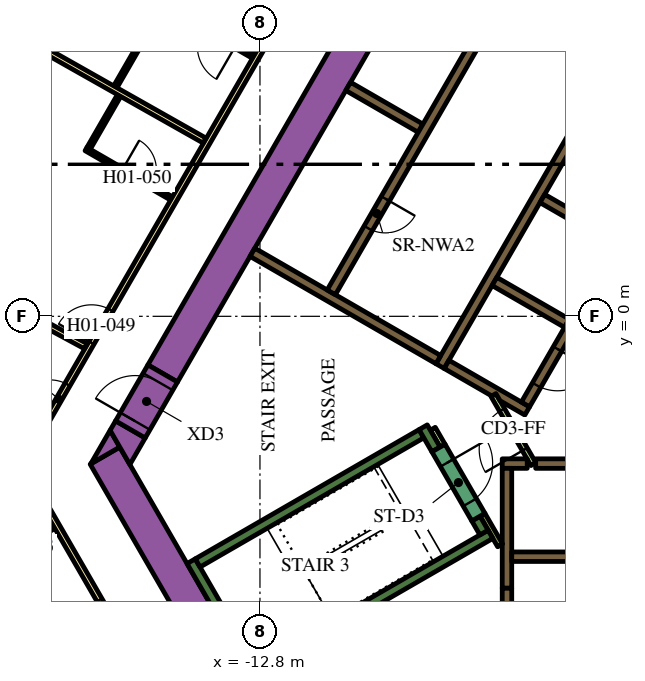
"""IFC4 building model, lengths in metres.
Left out: names, types, materials, properties, quantities, classifications, styles, units other than length and angle.
Written with IfcOpenShell. Run it as: python <this file> out.ifc"""

import sys

from ifc_helpers import new_model, si_unit, direction, frame, frame_2d, origin, place, context, subcontext, project, spatial, polyline, rectangle, outline, extrude, element, fill, save


model = new_model("IFC4")
c1 = context("Model", 3, precision=1e-05, world=origin(), true_north=direction((0.0, 1.0)))
c2 = subcontext(c1, "Body", "Model", "MODEL_VIEW")
j1 = project(units=[si_unit("LENGTHUNIT", "METRE"), si_unit("PLANEANGLEUNIT", "RADIAN")], contexts=[c1])
p1 = place(None, origin())
s1 = spatial("IfcSite", under=j1, at=p1, CompositionType="ELEMENT")
p2 = place(p1, origin())
s2 = spatial("IfcBuilding", under=s1, at=p2, CompositionType="ELEMENT")
p3 = place(p2, frame((0.0, 0.0, 27.6)))
s3 = spatial("IfcBuildingStorey", under=s2, at=p3, CompositionType="ELEMENT", Elevation=27.6)
p4 = place(p3, frame((-15.36, -1.503, 0.0), z_axis=(0.0, 0.0, 1.0), x_axis=(0.50000389221, 0.866023156604, 0.0)))
e1 = element("IfcWall", 1, at=p4, inside=s3, PredefinedType="SOLIDWALL", context=c2, shape_type="SweptSolid", body=[
    extrude(rectangle(XDim=21.0, YDim=0.9, at=frame_2d((10.5, 0.0))), origin(), (0.0, 0.0, 1.0), 3.9),
])
p5 = place(p3, frame((-12.134, -11.883, 0.0), z_axis=(0.0, 0.0, 1.0), x_axis=(-0.500005339912, 0.866022320763, 0.0)))
e2 = element("IfcWall", 2, at=p5, inside=s3, PredefinedType="SOLIDWALL", context=c2, shape_type="SweptSolid", body=[
    extrude(rectangle(XDim=9.488, YDim=0.9, at=frame_2d((4.744, 0.0))), origin(), (0.0, 0.0, 1.0), 3.9),
])
p6 = place(p3, origin())
e3 = element("IfcWall", 3, at=p6, inside=s3, PredefinedType="SOLIDWALL", context=c2, shape_type="SweptSolid", body=[
    extrude(outline(polyline([(-16.489, -3.44), (-17.251, -3.88), (-16.743, -3.0), (-16.489, -3.44)])), origin(), (0.0, 0.0, 1.0), 3.9),
])
e4 = element("IfcWall", 4, at=p6, inside=s3, PredefinedType="SOLIDWALL", context=c2, shape_type="SweptSolid", body=[
    extrude(outline(polyline([(-15.82, -3.201), (-16.223, -3.9), (-16.743, -3.0), (-16.599, -2.751), (-15.82, -3.201)])), origin(), (0.0, 0.0, 1.0), 3.9),
])
p7 = place(p3, frame((-12.885, -9.431, 0.0), z_axis=(0.0, 0.0, 1.0), x_axis=(-0.500020560727, 0.866013532718, 0.0)))
e5 = element("IfcWall", 5, at=p7, inside=s3, PredefinedType="SOLIDWALL", context=c2, shape_type="SweptSolid", body=[
    extrude(rectangle(XDim=3.45, YDim=0.25, at=frame_2d((1.725, 0.0))), origin(), (0.0, 0.0, 1.0), 3.9),
])
p8 = place(p3, frame((-14.44, -6.49, 0.0), z_axis=(0.0, 0.0, 1.0), x_axis=(0.866022966069, 0.500004222222, 0.0)))
e6 = element("IfcWall", 6, at=p8, inside=s3, PredefinedType="SOLIDWALL", context=c2, shape_type="SweptSolid", body=[
    extrude(rectangle(XDim=6.8, YDim=0.25, at=frame_2d((3.4, 0.0))), origin(), (0.0, 0.0, 1.0), 3.9),
])
p9 = place(p3, frame((-8.168, -3.503, 0.0), z_axis=(0.0, 0.0, 1.0), x_axis=(-0.499952099219, 0.866053057547, 0.0)))
e7 = element("IfcWall", 7, at=p9, inside=s3, PredefinedType="SOLIDWALL", context=c2, shape_type="SweptSolid", body=[
    extrude(rectangle(XDim=0.675, YDim=0.25, at=frame_2d((0.337, 0.0))), origin(), (0.0, 0.0, 1.0), 3.9),
])
p10 = place(p3, frame((-12.84, -9.261, 0.0), z_axis=(0.0, 0.0, 1.0), x_axis=(0.866016039709, 0.500016218704, 0.0)))
e8 = element("IfcWall", 8, at=p10, inside=s3, PredefinedType="SOLIDWALL", context=c2, shape_type="SweptSolid", body=[
    extrude(rectangle(XDim=7.05, YDim=0.25, at=frame_2d((3.525, 0.0))), origin(), (0.0, 0.0, 1.0), 3.9),
])
p11 = place(p3, frame((-6.905, -5.69, 0.0), z_axis=(0.0, 0.0, 1.0), x_axis=(-0.500402024738, 0.865793170242, 0.0)))
e9 = element("IfcWall", 9, at=p11, inside=s3, PredefinedType="SOLIDWALL", context=c2, shape_type="SweptSolid", body=[
    extrude(rectangle(XDim=0.425, YDim=0.25, at=frame_2d((0.212, 0.0))), origin(), (0.0, 0.0, 1.0), 3.9),
])
p12 = place(p3, frame((-5.545, -3.875, 0.0), z_axis=(0.0, 0.0, 1.0), x_axis=(1.0, 0.0, 0.0)))
e10 = element("IfcWall", 10, at=p12, inside=s3, PredefinedType="SOLIDWALL", context=c2, shape_type="SweptSolid", body=[
    extrude(rectangle(XDim=11.97, YDim=0.25, at=frame_2d((5.985, 0.0))), origin(), (0.0, 0.0, 1.0), 3.9),
])
p13 = place(p3, frame((-6.425, -3.875, 0.0), z_axis=(0.0, 0.0, 1.0), x_axis=(1.0, 0.0, 0.0)))
e11 = element("IfcWall", 11, at=p13, inside=s3, PredefinedType="SOLIDWALL", context=c2, shape_type="SweptSolid", body=[
    extrude(rectangle(XDim=0.658, YDim=0.25, at=frame_2d((0.329, 0.0))), origin(), (0.0, 0.0, 1.0), 3.9),
])
p14 = place(p3, frame((-6.3, -4.0, 0.0), z_axis=(0.0, 0.0, 1.0), x_axis=(0.0, -1.0, 0.0)))
e12 = element("IfcWall", 12, at=p14, inside=s3, PredefinedType="SOLIDWALL", context=c2, shape_type="SweptSolid", body=[
    extrude(rectangle(XDim=3.154, YDim=0.25, at=frame_2d((1.577, 0.0))), origin(), (0.0, 0.0, 1.0), 3.9),
])
p15 = place(p3, frame((-8.06, -1.311, 0.0), z_axis=(0.0, 0.0, 1.0), x_axis=(0.50000273126, 0.866023826885, 0.0)))
e13 = element("IfcWall", 13, at=p15, inside=s3, PredefinedType="SOLIDWALL", context=c2, shape_type="SweptSolid", body=[
    extrude(rectangle(XDim=10.33, YDim=0.25, at=frame_2d((5.165, 0.0))), origin(), (0.0, 0.0, 1.0), 3.9),
])
for number, where, z_axis, x_axis in (
    (14, (-5.369, 3.1, 0.0), (0.0, 0.0, 1.0), (0.866, -0.5, 0.0)),
    (15, (-4.724, -0.182, 0.0), (0.0, 0.0, 1.0), (-0.866, 0.5, 0.0)),
):
    element("IfcWall", number, at=place(p3, frame(where, z_axis=z_axis, x_axis=x_axis)), inside=s3, PredefinedType="SOLIDWALL", context=c2, shape_type="SweptSolid", body=[
        extrude(rectangle(XDim=2.2, YDim=0.25, at=frame_2d((1.1, 0.0))), origin(), (0.0, 0.0, 1.0), 3.9),
    ])
e16 = element("IfcWall", 16, at=p6, inside=s3, PredefinedType="SOLIDWALL", context=c2, shape_type="SweptSolid", body=[
    extrude(outline(polyline([(-5.922, -2.257), (-5.922, -2.257), (-5.705, -2.382), (-5.83, -2.598), (-6.483, -2.221), (-6.591, -2.033), (-6.591, -2.033), (-6.7, -2.096), (-7.952, -1.373), (-7.827, -1.156), (-5.922, -2.257)])), origin(), (0.0, 0.0, 1.0), 3.9),
])
p16 = place(p3, frame((-8.106, -1.14, 0.0), z_axis=(0.0, 0.0, 1.0), x_axis=(-0.866000643155, 0.500042884217, 0.0)))
e17 = element("IfcWall", 17, at=p16, inside=s3, PredefinedType="SOLIDWALL", context=c2, shape_type="SweptSolid", body=[
    extrude(rectangle(XDim=5.65, YDim=0.25, at=frame_2d((2.825, 0.0))), origin(), (0.0, 0.0, 1.0), 3.9),
])
p17 = place(p3, frame((-8.574, 4.95, 0.0), z_axis=(0.0, 0.0, 1.0), x_axis=(-0.866008176907, 0.50002983664, 0.0)))
e18 = element("IfcWall", 18, at=p17, inside=s3, PredefinedType="SOLIDWALL", context=c2, shape_type="SweptSolid", body=[
    extrude(rectangle(XDim=2.2, YDim=0.25, at=frame_2d((1.1, 0.0))), origin(), (0.0, 0.0, 1.0), 3.9),
])
p18 = place(p3, frame((-6.48, -6.027, 0.0), z_axis=(0.0, 0.0, 1.0), x_axis=(-0.499927229454, 0.866067413802, 0.0)))
e19 = element("IfcWall", 19, at=p18, inside=s3, PredefinedType="PARTITIONING", context=c2, shape_type="SweptSolid", body=[
    extrude(rectangle(XDim=0.929, YDim=0.15, at=frame_2d((0.464, 0.0))), origin(), (0.0, 0.0, 1.0), 3.9),
])
p19 = place(p3, frame((-8.252, -2.958, 0.0), z_axis=(0.0, 0.0, 1.0), x_axis=(0.500174715838, -0.865924508047, 0.0)))
e20 = element("IfcWall", 20, at=p19, inside=s3, PredefinedType="PARTITIONING", context=c2, shape_type="SweptSolid", body=[
    extrude(rectangle(XDim=0.514, YDim=0.15, at=frame_2d((0.257, 0.0))), origin(), (0.0, 0.0, 1.0), 2.75),
])
p20 = place(p3, frame((-6.175, -6.325, 0.0), z_axis=(0.0, 0.0, 1.0), x_axis=(1.0, 0.0, 0.0)))
e21 = element("IfcWall", 21, at=p20, inside=s3, PredefinedType="SOLIDWALL", context=c2, shape_type="SweptSolid", body=[
    extrude(rectangle(XDim=12.35, YDim=0.25, at=frame_2d((6.175, 0.0))), origin(), (0.0, 0.0, 1.0), 3.9),
])
p21 = place(p20, frame((3.205, 0.0, 0.0)))
e22 = element("IfcOpeningElement", 22, at=p21, cuts=e21, PredefinedType="OPENING", context=c2, shape_type="SweptSolid", body=[
    extrude(rectangle(XDim=0.9, YDim=2.1, at=frame_2d((0.45, 1.05))), frame((0.0, 0.135, 0.0), z_axis=(0.0, -1.0, 0.0), x_axis=(1.0, 0.0, 0.0)), (0.0, 0.0, 1.0), 0.27),
])
p22 = place(p20, frame((8.145, 0.0, 0.0)))
e23 = element("IfcOpeningElement", 23, at=p22, cuts=e21, PredefinedType="OPENING", context=c2, shape_type="SweptSolid", body=[
    extrude(rectangle(XDim=1.1, YDim=2.1, at=frame_2d((0.55, 1.05))), frame((0.0, 0.135, 0.0), z_axis=(0.0, -1.0, 0.0), x_axis=(1.0, 0.0, 0.0)), (0.0, 0.0, 1.0), 0.27),
])
p23 = place(p20, frame((10.665, 0.0, 0.0)))
e24 = element("IfcOpeningElement", 24, at=p23, cuts=e21, PredefinedType="OPENING", context=c2, shape_type="SweptSolid", body=[
    extrude(rectangle(XDim=1.1, YDim=2.1, at=frame_2d((0.55, 1.05))), frame((0.0, 0.135, 0.0), z_axis=(0.0, -1.0, 0.0), x_axis=(1.0, 0.0, 0.0)), (0.0, 0.0, 1.0), 0.27),
])
p24 = place(p3, frame((-6.008, 9.144, 0.0), z_axis=(0.0, 0.0, 1.0), x_axis=(-0.500006956611, -0.866021387346, 0.0)))
e25 = element("IfcWall", 25, at=p24, inside=s3, PredefinedType="SOLIDWALL", context=c2, shape_type="SweptSolid", body=[
    extrude(rectangle(XDim=9.83, YDim=0.25, at=frame_2d((4.915, 0.0))), origin(), (0.0, 0.0, 1.0), 3.9),
])
p25 = place(p24, frame((6.985, 0.0, 0.0)))
e26 = element("IfcOpeningElement", 26, at=p25, cuts=e25, PredefinedType="OPENING", context=c2, shape_type="SweptSolid", body=[
    extrude(rectangle(XDim=0.9, YDim=2.1, at=frame_2d((0.45, 1.05))), frame((0.0, 0.135, 0.0), z_axis=(0.0, -1.0, 0.0), x_axis=(1.0, 0.0, 0.0)), (0.0, 0.0, 1.0), 0.27),
])
p26 = place(p3, frame((-0.898, 6.194, 0.0), z_axis=(0.0, 0.0, 1.0), x_axis=(-0.499996202215, -0.866027596426, 0.0)))
e27 = element("IfcWall", 27, at=p26, inside=s3, PredefinedType="SOLIDWALL", context=c2, shape_type="SweptSolid", body=[
    extrude(rectangle(XDim=9.83, YDim=0.25, at=frame_2d((4.915, 0.0))), origin(), (0.0, 0.0, 1.0), 3.9),
])
p27 = place(p26, frame((0.585, 0.0, 0.0)))
e28 = element("IfcOpeningElement", 28, at=p27, cuts=e27, PredefinedType="OPENING", context=c2, shape_type="SweptSolid", body=[
    extrude(rectangle(XDim=1.1, YDim=2.1, at=frame_2d((0.55, 1.05))), frame((0.0, 0.135, 0.0), z_axis=(0.0, -1.0, 0.0), x_axis=(1.0, 0.0, 0.0)), (0.0, 0.0, 1.0), 0.27),
])
p28 = place(p26, frame((3.105, 0.0, 0.0)))
e29 = element("IfcOpeningElement", 29, at=p28, cuts=e27, PredefinedType="OPENING", context=c2, shape_type="SweptSolid", body=[
    extrude(rectangle(XDim=1.1, YDim=2.1, at=frame_2d((0.55, 1.05))), frame((0.0, 0.135, 0.0), z_axis=(0.0, -1.0, 0.0), x_axis=(1.0, 0.0, 0.0)), (0.0, 0.0, 1.0), 0.27),
])
p29 = place(p26, frame((5.625, 0.0, 0.0)))
e30 = element("IfcOpeningElement", 30, at=p29, cuts=e27, PredefinedType="OPENING", context=c2, shape_type="SweptSolid", body=[
    extrude(rectangle(XDim=1.1, YDim=2.1, at=frame_2d((0.55, 1.05))), frame((0.0, 0.135, 0.0), z_axis=(0.0, -1.0, 0.0), x_axis=(1.0, 0.0, 0.0)), (0.0, 0.0, 1.0), 0.27),
])
p30 = place(p26, frame((8.145, 0.0, 0.0)))
e31 = element("IfcOpeningElement", 31, at=p30, cuts=e27, PredefinedType="OPENING", context=c2, shape_type="SweptSolid", body=[
    extrude(rectangle(XDim=1.1, YDim=2.1, at=frame_2d((0.55, 1.05))), frame((0.0, 0.135, 0.0), z_axis=(0.0, -1.0, 0.0), x_axis=(1.0, 0.0, 0.0)), (0.0, 0.0, 1.0), 0.27),
])
p31 = place(p3, frame((-8.103, -3.466, 0.0), z_axis=(0.0, 0.0, 1.0), x_axis=(0.500078061341, -0.865980330357, 0.0)))
e32 = element("IfcWall", 32, at=p31, inside=s3, PredefinedType="SOLIDWALL", context=c2, shape_type="SweptSolid", body=[
    extrude(rectangle(XDim=2.1, YDim=0.4, at=frame_2d((1.05, 0.0))), origin(), (0.0, 0.0, 1.0), 3.9),
])
p32 = place(p31, frame((0.45, 0.0, 0.0)))
e33 = element("IfcOpeningElement", 33, at=p32, cuts=e32, PredefinedType="OPENING", context=c2, shape_type="SweptSolid", body=[
    extrude(rectangle(XDim=1.2, YDim=2.1, at=frame_2d((0.6, 1.05))), frame((0.0, 0.21, 0.0), z_axis=(0.0, -1.0, 0.0), x_axis=(1.0, 0.0, 0.0)), (0.0, 0.0, 1.0), 0.42),
])
p33 = place(p3, frame((-6.3, -7.154, 0.0), z_axis=(0.0, 0.0, 1.0), x_axis=(0.0, -1.0, 0.0)))
e34 = element("IfcWall", 34, at=p33, inside=s3, PredefinedType="SOLIDWALL", context=c2, shape_type="SweptSolid", body=[
    extrude(rectangle(XDim=1.8, YDim=0.25, at=frame_2d((0.9, 0.0))), origin(), (0.0, 0.0, 1.0), 3.9),
])
p34 = place(p33, frame((0.45, 0.0, 0.0)))
e35 = element("IfcOpeningElement", 35, at=p34, cuts=e34, PredefinedType="OPENING", context=c2, shape_type="SweptSolid", body=[
    extrude(rectangle(XDim=0.9, YDim=2.1, at=frame_2d((0.45, 1.05))), frame((0.0, 0.135, 0.0), z_axis=(0.0, -1.0, 0.0), x_axis=(1.0, 0.0, 0.0)), (0.0, 0.0, 1.0), 0.27),
])
p35 = place(p3, frame((-5.606, -3.89, 0.0), z_axis=(0.0, 0.0, 1.0), x_axis=(-0.500027713859, 0.866009402589, 0.0)))
e36 = element("IfcWall", 36, at=p35, inside=s3, PredefinedType="PARTITIONING", context=c2, shape_type="SweptSolid", body=[
    extrude(rectangle(XDim=2.1, YDim=0.15, at=frame_2d((1.05, 0.0))), origin(), (0.0, 0.0, 1.0), 2.75),
])
p36 = place(p35, frame((0.45, 0.0, 0.0)))
e37 = element("IfcOpeningElement", 37, at=p36, cuts=e36, PredefinedType="OPENING", context=c2, shape_type="SweptSolid", body=[
    extrude(rectangle(XDim=1.2, YDim=2.1, at=frame_2d((0.6, 1.05))), frame((0.0, 0.085, 0.0), z_axis=(0.0, -1.0, 0.0), x_axis=(1.0, 0.0, 0.0)), (0.0, 0.0, 1.0), 0.17),
])
p37 = place(p3, frame((-16.209, -2.976, 0.0), z_axis=(0.0, 0.0, 1.0), x_axis=(0.499954529098, 0.86605165483, 0.0)))
e38 = element("IfcWall", 38, at=p37, inside=s3, PredefinedType="SOLIDWALL", context=c2, shape_type="SweptSolid", body=[
    extrude(rectangle(XDim=1.7, YDim=0.9, at=frame_2d((0.85, 0.0))), origin(), (0.0, 0.0, 1.0), 3.9),
])
p38 = place(p37, frame((0.25, 0.0, 0.0)))
e39 = element("IfcOpeningElement", 39, at=p38, cuts=e38, PredefinedType="OPENING", context=c2, shape_type="SweptSolid", body=[
    extrude(rectangle(XDim=1.2, YDim=2.1, at=frame_2d((0.6, 1.05))), frame((0.0, 0.46, 0.0), z_axis=(0.0, -1.0, 0.0), x_axis=(1.0, 0.0, 0.0)), (0.0, 0.0, 1.0), 0.92),
])
p39 = place(p3, frame((-19.081, -3.9, 0.0), z_axis=(0.0, 0.0, 1.0), x_axis=(0.499998313975, 0.866026377209, 0.0)))
e40 = element("IfcWall", 40, at=p39, inside=s3, PredefinedType="PARTITIONING", context=c2, shape_type="SweptSolid", body=[
    extrude(rectangle(XDim=25.766, YDim=0.15, at=frame_2d((12.883, 0.0))), origin(), (0.0, 0.0, 1.0), 2.75),
])
p40 = place(p39, frame((24.586, 0.0, 0.0)))
e41 = element("IfcOpeningElement", 41, at=p40, cuts=e40, PredefinedType="OPENING", context=c2, shape_type="SweptSolid", body=[
    extrude(rectangle(XDim=1.0, YDim=2.1, at=frame_2d((0.5, 1.05))), frame((0.0, 0.085, 0.0), z_axis=(0.0, -1.0, 0.0), x_axis=(1.0, 0.0, 0.0)), (0.0, 0.0, 1.0), 0.17),
])
p41 = place(p39, frame((16.196, 0.0, 0.0)))
e42 = element("IfcOpeningElement", 42, at=p41, cuts=e40, PredefinedType="OPENING", context=c2, shape_type="SweptSolid", body=[
    extrude(rectangle(XDim=1.0, YDim=2.1, at=frame_2d((0.5, 1.05))), frame((0.0, 0.085, 0.0), z_axis=(0.0, -1.0, 0.0), x_axis=(1.0, 0.0, 0.0)), (0.0, 0.0, 1.0), 0.17),
])
p42 = place(p39, frame((14.789, 0.0, 0.0)))
e43 = element("IfcOpeningElement", 43, at=p42, cuts=e40, PredefinedType="OPENING", context=c2, shape_type="SweptSolid", body=[
    extrude(rectangle(XDim=1.1, YDim=2.1, at=frame_2d((0.55, 1.05))), frame((0.0, 0.085, 0.0), z_axis=(0.0, -1.0, 0.0), x_axis=(1.0, 0.0, 0.0)), (0.0, 0.0, 1.0), 0.17),
])
p43 = place(p39, frame((3.698, 0.0, 0.0)))
e44 = element("IfcOpeningElement", 44, at=p43, cuts=e40, PredefinedType="OPENING", context=c2, shape_type="SweptSolid", body=[
    extrude(rectangle(XDim=1.0, YDim=2.1, at=frame_2d((0.5, 1.05))), frame((0.0, 0.085, 0.0), z_axis=(0.0, -1.0, 0.0), x_axis=(1.0, 0.0, 0.0)), (0.0, 0.0, 1.0), 0.17),
])
p44 = place(p39, frame((1.531, 0.0, 0.0)))
e45 = element("IfcOpeningElement", 45, at=p44, cuts=e40, PredefinedType="OPENING", context=c2, shape_type="SweptSolid", body=[
    extrude(rectangle(XDim=0.9, YDim=2.1, at=frame_2d((0.45, 1.05))), frame((0.0, 0.085, 0.0), z_axis=(0.0, -1.0, 0.0), x_axis=(1.0, 0.0, 0.0)), (0.0, 0.0, 1.0), 0.17),
])
p45 = place(p3, frame((-16.412, -8.523, 0.0), z_axis=(0.0, 0.0, 1.0), x_axis=(-0.500001929737, 0.866024289647, 0.0)))
e46 = element("IfcWall", 46, at=p45, inside=s3, PredefinedType="PARTITIONING", context=c2, shape_type="SweptSolid", body=[
    extrude(rectangle(XDim=5.268, YDim=0.15, at=frame_2d((2.634, 0.0))), origin(), (0.0, 0.0, 1.0), 2.75),
])
p46 = place(p45, frame((0.226, 0.0, 0.0)))
e47 = element("IfcOpeningElement", 47, at=p46, cuts=e46, PredefinedType="OPENING", context=c2, shape_type="SweptSolid", body=[
    extrude(rectangle(XDim=1.0, YDim=2.1, at=frame_2d((0.5, 1.05))), frame((0.0, 0.085, 0.0), z_axis=(0.0, -1.0, 0.0), x_axis=(1.0, 0.0, 0.0)), (0.0, 0.0, 1.0), 0.17),
])
p47 = place(p3, frame((-24.145, 2.871, 0.0), z_axis=(0.0, 0.0, 1.0), x_axis=(0.879551725039, -0.475803281809, 0.0)))
e48 = element("IfcWall", 48, at=p47, inside=s3, PredefinedType="PARTITIONING", context=c2, shape_type="SweptSolid", body=[
    extrude(rectangle(XDim=7.688, YDim=0.15, at=frame_2d((3.844, 0.0))), origin(), (0.0, 0.0, 1.0), 2.75),
])
p48 = place(p3, frame((-21.052, 8.464, 0.0), z_axis=(0.0, 0.0, 1.0), x_axis=(0.87059371954, -0.492002617368, 0.0)))
e49 = element("IfcWall", 49, at=p48, inside=s3, PredefinedType="PARTITIONING", context=c2, shape_type="SweptSolid", body=[
    extrude(rectangle(XDim=7.803, YDim=0.15, at=frame_2d((3.902, 0.0))), origin(), (0.0, 0.0, 1.0), 2.75),
])
p49 = place(p3, frame((-12.972, 6.831, 0.0), z_axis=(0.0, 0.0, 1.0), x_axis=(-0.866018616679, 0.500011755427, 0.0)))
e50 = element("IfcWall", 50, at=p49, inside=s3, PredefinedType="PARTITIONING", context=c2, shape_type="SweptSolid", body=[
    extrude(rectangle(XDim=2.8, YDim=0.1, at=frame_2d((1.4, 0.0))), origin(), (0.0, 0.0, 1.0), 2.75),
])
p50 = place(p49, frame((0.55, 0.0, 0.0)))
e51 = element("IfcOpeningElement", 51, at=p50, cuts=e50, PredefinedType="OPENING", context=c2, shape_type="SweptSolid", body=[
    extrude(rectangle(XDim=1.0, YDim=2.1, at=frame_2d((0.5, 1.05))), frame((0.0, 0.06, 0.0), z_axis=(0.0, -1.0, 0.0), x_axis=(1.0, 0.0, 0.0)), (0.0, 0.0, 1.0), 0.12),
])
p51 = place(p3, frame((-15.379, 8.163, 0.0), z_axis=(0.0, 0.0, 1.0), x_axis=(-0.499987006516, -0.866032905446, 0.0)))
e52 = element("IfcWall", 52, at=p51, inside=s3, PredefinedType="PARTITIONING", context=c2, shape_type="SweptSolid", body=[
    extrude(rectangle(XDim=2.45, YDim=0.1, at=frame_2d((1.225, 0.0))), origin(), (0.0, 0.0, 1.0), 2.75),
])
p52 = place(p3, frame((-17.378, 4.401, 0.0), z_axis=(0.0, 0.0, 1.0), x_axis=(0.865997922154, -0.500047596559, 0.0)))
e53 = element("IfcWall", 53, at=p52, inside=s3, PredefinedType="PARTITIONING", context=c2, shape_type="SweptSolid", body=[
    extrude(rectangle(XDim=2.6, YDim=0.1, at=frame_2d((1.3, 0.0))), origin(), (0.0, 0.0, 1.0), 2.75),
])
p53 = place(p52, frame((1.1, 0.0, 0.0)))
e54 = element("IfcOpeningElement", 54, at=p53, cuts=e53, PredefinedType="OPENING", context=c2, shape_type="SweptSolid", body=[
    extrude(rectangle(XDim=0.9, YDim=2.1, at=frame_2d((0.45, 1.05))), frame((0.0, 0.06, 0.0), z_axis=(0.0, -1.0, 0.0), x_axis=(1.0, 0.0, 0.0)), (0.0, 0.0, 1.0), 0.12),
])
p54 = place(p3, frame((-17.309, 4.419, 0.0), z_axis=(0.0, 0.0, 1.0), x_axis=(0.499880961361, 0.866094119867, 0.0)))
e55 = element("IfcWall", 55, at=p54, inside=s3, PredefinedType="PARTITIONING", context=c2, shape_type="SweptSolid", body=[
    extrude(rectangle(XDim=1.6, YDim=0.1, at=frame_2d((0.8, 0.0))), origin(), (0.0, 0.0, 1.0), 2.75),
])
p55 = place(p3, frame((-20.473, -6.84, 0.0), z_axis=(0.0, 0.0, 1.0), x_axis=(0.865997922154, 0.500047596559, 0.0)))
e56 = element("IfcWall", 56, at=p55, inside=s3, PredefinedType="PARTITIONING", context=c2, shape_type="SweptSolid", body=[
    extrude(rectangle(XDim=2.6, YDim=0.1, at=frame_2d((1.3, 0.0))), origin(), (0.0, 0.0, 1.0), 2.75),
])
p56 = place(p55, frame((1.1, 0.0, 0.0)))
e57 = element("IfcOpeningElement", 57, at=p56, cuts=e56, PredefinedType="OPENING", context=c2, shape_type="SweptSolid", body=[
    extrude(rectangle(XDim=0.9, YDim=2.1, at=frame_2d((0.45, 1.05))), frame((0.0, 0.06, 0.0), z_axis=(0.0, -1.0, 0.0), x_axis=(1.0, 0.0, 0.0)), (0.0, 0.0, 1.0), 0.12),
])
p57 = place(p25, origin())
e58 = element("IfcDoor", 58, at=p57, inside=s3, OperationType="SINGLE_SWING_LEFT", PredefinedType="DOOR", context=c2, shape_type="SweptSolid", body=[
    extrude(rectangle(XDim=0.9, YDim=2.1, at=frame_2d((0.45, 1.05))), frame((0.0, 0.025, 0.0), z_axis=(0.0, -1.0, 0.0), x_axis=(1.0, 0.0, 0.0)), (0.0, 0.0, 1.0), 0.05),
])
fill(e26, e58)
p58 = place(p30, origin())
e59 = element("IfcDoor", 59, at=p58, inside=s3, OperationType="DOUBLE_DOOR_SLIDING", PredefinedType="DOOR", context=c2, shape_type="SweptSolid", body=[
    extrude(rectangle(XDim=1.1, YDim=2.1, at=frame_2d((0.55, 1.05))), frame((0.0, 0.025, 0.0), z_axis=(0.0, -1.0, 0.0), x_axis=(1.0, 0.0, 0.0)), (0.0, 0.0, 1.0), 0.05),
])
fill(e31, e59)
p59 = place(p32, origin())
e60 = element("IfcDoor", 60, at=p59, inside=s3, OperationType="SINGLE_SWING_LEFT", PredefinedType="DOOR", context=c2, shape_type="SweptSolid", body=[
    extrude(rectangle(XDim=1.2, YDim=2.1, at=frame_2d((0.6, 1.05))), frame((0.0, 0.025, 0.0), z_axis=(0.0, -1.0, 0.0), x_axis=(1.0, 0.0, 0.0)), (0.0, 0.0, 1.0), 0.05),
])
fill(e33, e60)
p60 = place(p36, origin())
e61 = element("IfcDoor", 61, at=p60, inside=s3, OperationType="SINGLE_SWING_LEFT", PredefinedType="DOOR", context=c2, shape_type="SweptSolid", body=[
    extrude(rectangle(XDim=1.2, YDim=2.1, at=frame_2d((0.6, 1.05))), frame((0.0, 0.025, 0.0), z_axis=(0.0, -1.0, 0.0), x_axis=(1.0, 0.0, 0.0)), (0.0, 0.0, 1.0), 0.05),
])
fill(e37, e61)
p61 = place(p38, origin())
e62 = element("IfcDoor", 62, at=p61, inside=s3, OperationType="SINGLE_SWING_LEFT", PredefinedType="DOOR", context=c2, shape_type="SweptSolid", body=[
    extrude(rectangle(XDim=1.2, YDim=2.1, at=frame_2d((0.6, 1.05))), frame((0.0, 0.025, 0.0), z_axis=(0.0, -1.0, 0.0), x_axis=(1.0, 0.0, 0.0)), (0.0, 0.0, 1.0), 0.05),
])
fill(e39, e62)
p62 = place(p43, origin())
e63 = element("IfcDoor", 63, at=p62, inside=s3, OperationType="SINGLE_SWING_LEFT", PredefinedType="DOOR", context=c2, shape_type="SweptSolid", body=[
    extrude(rectangle(XDim=1.0, YDim=2.1, at=frame_2d((0.5, 1.05))), frame((0.0, 0.025, 0.0), z_axis=(0.0, -1.0, 0.0), x_axis=(1.0, 0.0, 0.0)), (0.0, 0.0, 1.0), 0.05),
])
fill(e44, e63)
p63 = place(p53, origin())
e64 = element("IfcDoor", 64, at=p63, inside=s3, OperationType="SINGLE_SWING_LEFT", PredefinedType="DOOR", context=c2, shape_type="SweptSolid", body=[
    extrude(rectangle(XDim=0.9, YDim=2.1, at=frame_2d((0.45, 1.05))), frame((0.0, 0.025, 0.0), z_axis=(0.0, -1.0, 0.0), x_axis=(1.0, 0.0, 0.0)), (0.0, 0.0, 1.0), 0.05),
])
fill(e54, e64)
p64 = place(p44, origin())
e65 = element("IfcDoor", 65, at=p64, inside=s3, OperationType="SINGLE_SWING_LEFT", PredefinedType="DOOR", context=c2, shape_type="SweptSolid", body=[
    extrude(rectangle(XDim=0.9, YDim=2.1, at=frame_2d((0.45, 1.05))), frame((0.0, 0.025, 0.0), z_axis=(0.0, -1.0, 0.0), x_axis=(1.0, 0.0, 0.0)), (0.0, 0.0, 1.0), 0.05),
])
fill(e45, e65)
p65 = place(p46, origin())
e66 = element("IfcDoor", 66, at=p65, inside=s3, OperationType="SINGLE_SWING_LEFT", PredefinedType="DOOR", context=c2, shape_type="SweptSolid", body=[
    extrude(rectangle(XDim=1.0, YDim=2.1, at=frame_2d((0.5, 1.05))), frame((0.0, 0.025, 0.0), z_axis=(0.0, -1.0, 0.0), x_axis=(1.0, 0.0, 0.0)), (0.0, 0.0, 1.0), 0.05),
])
fill(e47, e66)
save(model, sys.argv[1])
